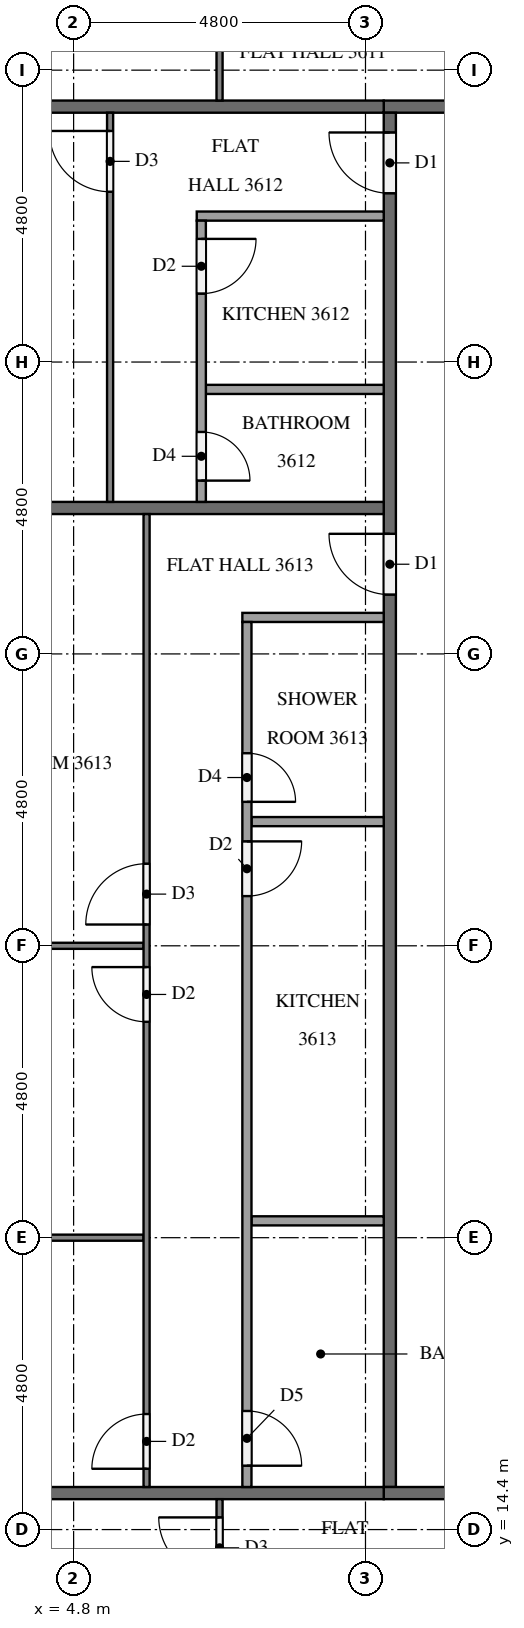
"""IFC4 building model, lengths in metres.
Left out: names, types, materials, properties, quantities, classifications, styles, units other than length and angle.
Written with IfcOpenShell. Run it as: python <this file> out.ifc"""

import sys

from ifc_helpers import new_model, si_unit, direction, frame, frame_2d, origin, place, context, subcontext, project, spatial, rectangle, extrude, element, fill, save


model = new_model("IFC4")
c1 = context("Model", 3, precision=1e-05, world=origin(), true_north=direction((0.0, 1.0)))
c2 = subcontext(c1, "Body", "Model", "MODEL_VIEW")
j1 = project(units=[si_unit("LENGTHUNIT", "METRE"), si_unit("PLANEANGLEUNIT", "RADIAN")], contexts=[c1])
p1 = place(None, origin())
s1 = spatial("IfcSite", under=j1, at=p1, CompositionType="ELEMENT")
p2 = place(p1, origin())
s2 = spatial("IfcBuilding", under=s1, at=p2, CompositionType="ELEMENT")
p3 = place(p2, frame((0.0, 0.0, 140.1)))
s3 = spatial("IfcBuildingStorey", under=s2, at=p3, CompositionType="ELEMENT", Elevation=140.1)
p4 = place(p3, frame((12.1, 37.8, 0.0), z_axis=(0.0, 0.0, 1.0), x_axis=(-1.0, 0.0, 0.0)))
e1 = element("IfcWall", 1, at=p4, inside=s3, PredefinedType="PARTITIONING", context=c2, shape_type="SweptSolid", body=[
    extrude(rectangle(XDim=2.2, YDim=0.2, at=frame_2d((1.1, 0.0))), origin(), (0.0, 0.0, 1.0), 3.1),
])
p5 = place(p3, frame((10.0, 15.1, 0.0), z_axis=(0.0, 0.0, 1.0), x_axis=(0.0, 1.0, 0.0)))
e2 = element("IfcWall", 2, at=p5, inside=s3, PredefinedType="PARTITIONING", context=c2, shape_type="SweptSolid", body=[
    extrude(rectangle(XDim=22.6, YDim=0.2, at=frame_2d((11.3, 0.0))), origin(), (0.0, 0.0, 1.0), 3.1),
])
p6 = place(p5, frame((21.275, 0.0, 0.0)))
e3 = element("IfcOpeningElement", 3, at=p6, cuts=e2, PredefinedType="OPENING", context=c2, shape_type="SweptSolid", body=[
    extrude(rectangle(XDim=1.0, YDim=2.1, at=frame_2d((0.5, 1.05))), frame((0.0, 0.11, 0.0), z_axis=(0.0, -1.0, 0.0), x_axis=(1.0, 0.0, 0.0)), (0.0, 0.0, 1.0), 0.22),
])
p7 = place(p5, frame((14.675, 0.0, 0.0)))
e4 = element("IfcOpeningElement", 4, at=p7, cuts=e2, PredefinedType="OPENING", context=c2, shape_type="SweptSolid", body=[
    extrude(rectangle(XDim=1.0, YDim=2.1, at=frame_2d((0.5, 1.05))), frame((0.0, 0.11, 0.0), z_axis=(0.0, -1.0, 0.0), x_axis=(1.0, 0.0, 0.0)), (0.0, 0.0, 1.0), 0.22),
])
p8 = place(p3, frame((9.9, 15.0, 0.0), z_axis=(0.0, 0.0, 1.0), x_axis=(1.0, 0.0, 0.0)))
e5 = element("IfcWall", 5, at=p8, inside=s3, PredefinedType="PARTITIONING", context=c2, shape_type="SweptSolid", body=[
    extrude(rectangle(XDim=2.2, YDim=0.2, at=frame_2d((1.1, 0.0))), origin(), (0.0, 0.0, 1.0), 3.1),
])
p9 = place(p3, frame((0.375, 37.8, 0.0), z_axis=(0.0, 0.0, 1.0), x_axis=(1.0, 0.0, 0.0)))
e6 = element("IfcWall", 6, at=p9, inside=s3, PredefinedType="PARTITIONING", context=c2, shape_type="SweptSolid", body=[
    extrude(rectangle(XDim=9.525, YDim=0.2, at=frame_2d((4.762, 0.0))), origin(), (0.0, 0.0, 1.0), 3.1),
])
for number, where, z_axis, x_axis in (
    (7, (0.1, 31.2, 0.0), (0.0, 0.0, 1.0), (1.0, 0.0, 0.0)),
    (8, (0.1, 15.0, 0.0), (0.0, 0.0, 1.0), (1.0, 0.0, 0.0)),
):
    element("IfcWall", number, at=place(p3, frame(where, z_axis=z_axis, x_axis=x_axis)), inside=s3, PredefinedType="PARTITIONING", context=c2, shape_type="SweptSolid", body=[
        extrude(rectangle(XDim=9.8, YDim=0.2, at=frame_2d((4.9, 0.0))), origin(), (0.0, 0.0, 1.0), 3.1),
    ])
p10 = place(p3, frame((7.2, 37.9, 0.0), z_axis=(0.0, 0.0, 1.0), x_axis=(0.0, 1.0, 0.0)))
e9 = element("IfcWall", 9, at=p10, inside=s3, PredefinedType="PARTITIONING", context=c2, shape_type="SweptSolid", body=[
    extrude(rectangle(XDim=14.8, YDim=0.1, at=frame_2d((7.4, 0.0))), origin(), (0.0, 0.0, 1.0), 3.1),
])
p11 = place(p10, frame((3.95, 0.0, 0.0)))
e10 = element("IfcOpeningElement", 10, at=p11, cuts=e9, PredefinedType="OPENING", context=c2, shape_type="SweptSolid", body=[
    extrude(rectangle(XDim=1.0, YDim=2.1, at=frame_2d((0.5, 1.05))), frame((0.0, 0.06, 0.0), z_axis=(0.0, -1.0, 0.0), x_axis=(1.0, 0.0, 0.0)), (0.0, 0.0, 1.0), 0.12),
])
p12 = place(p10, frame((5.65, 0.0, 0.0)))
e11 = element("IfcOpeningElement", 11, at=p12, cuts=e9, PredefinedType="OPENING", context=c2, shape_type="SweptSolid", body=[
    extrude(rectangle(XDim=0.9, YDim=2.1, at=frame_2d((0.45, 1.05))), frame((0.0, 0.06, 0.0), z_axis=(0.0, -1.0, 0.0), x_axis=(1.0, 0.0, 0.0)), (0.0, 0.0, 1.0), 0.12),
])
p13 = place(p10, frame((13.6, 0.0, 0.0)))
e12 = element("IfcOpeningElement", 12, at=p13, cuts=e9, PredefinedType="OPENING", context=c2, shape_type="SweptSolid", body=[
    extrude(rectangle(XDim=0.9, YDim=2.1, at=frame_2d((0.45, 1.05))), frame((0.0, 0.06, 0.0), z_axis=(0.0, -1.0, 0.0), x_axis=(1.0, 0.0, 0.0)), (0.0, 0.0, 1.0), 0.12),
])
p14 = place(p3, frame((5.4, 31.3, 0.0), z_axis=(0.0, 0.0, 1.0), x_axis=(0.0, 1.0, 0.0)))
e13 = element("IfcWall", 13, at=p14, inside=s3, PredefinedType="PARTITIONING", context=c2, shape_type="SweptSolid", body=[
    extrude(rectangle(XDim=6.4, YDim=0.1, at=frame_2d((3.2, 0.0))), origin(), (0.0, 0.0, 1.0), 3.1),
])
p15 = place(p14, frame((5.1, 0.0, 0.0)))
e14 = element("IfcOpeningElement", 14, at=p15, cuts=e13, PredefinedType="OPENING", context=c2, shape_type="SweptSolid", body=[
    extrude(rectangle(XDim=1.0, YDim=2.1, at=frame_2d((0.5, 1.05))), frame((0.0, 0.06, 0.0), z_axis=(0.0, -1.0, 0.0), x_axis=(1.0, 0.0, 0.0)), (0.0, 0.0, 1.0), 0.12),
])
p16 = place(p3, frame((9.9, 33.15, 0.0), z_axis=(0.0, 0.0, 1.0), x_axis=(-1.0, 0.0, 0.0)))
e15 = element("IfcWall", 15, at=p16, inside=s3, PredefinedType="PARTITIONING", context=c2, shape_type="SweptSolid", body=[
    extrude(rectangle(XDim=2.925, YDim=0.15, at=frame_2d((1.462, 0.0))), origin(), (0.0, 0.0, 1.0), 3.1),
])
p17 = place(p3, frame((9.9, 36.0, 0.0), z_axis=(0.0, 0.0, 1.0), x_axis=(-1.0, 0.0, 0.0)))
e16 = element("IfcWall", 16, at=p17, inside=s3, PredefinedType="PARTITIONING", context=c2, shape_type="SweptSolid", body=[
    extrude(rectangle(XDim=3.075, YDim=0.15, at=frame_2d((1.538, 0.0))), origin(), (0.0, 0.0, 1.0), 3.1),
])
p18 = place(p3, frame((6.9, 35.925, 0.0), z_axis=(0.0, 0.0, 1.0), x_axis=(0.0, -1.0, 0.0)))
e17 = element("IfcWall", 17, at=p18, inside=s3, PredefinedType="PARTITIONING", context=c2, shape_type="SweptSolid", body=[
    extrude(rectangle(XDim=4.625, YDim=0.15, at=frame_2d((2.312, 0.0))), origin(), (0.0, 0.0, 1.0), 3.1),
])
p19 = place(p18, frame((0.3, 0.0, 0.0)))
e18 = element("IfcOpeningElement", 18, at=p19, cuts=e17, PredefinedType="OPENING", context=c2, shape_type="SweptSolid", body=[
    extrude(rectangle(XDim=0.9, YDim=2.1, at=frame_2d((0.45, 1.05))), frame((0.0, 0.085, 0.0), z_axis=(0.0, -1.0, 0.0), x_axis=(1.0, 0.0, 0.0)), (0.0, 0.0, 1.0), 0.17),
])
p20 = place(p18, frame((3.475, 0.0, 0.0)))
e19 = element("IfcOpeningElement", 19, at=p20, cuts=e17, PredefinedType="OPENING", context=c2, shape_type="SweptSolid", body=[
    extrude(rectangle(XDim=0.8, YDim=2.1, at=frame_2d((0.4, 1.05))), frame((0.0, 0.085, 0.0), z_axis=(0.0, -1.0, 0.0), x_axis=(1.0, 0.0, 0.0)), (0.0, 0.0, 1.0), 0.17),
])
p21 = place(p3, frame((5.95, 24.0, 0.0), z_axis=(0.0, 0.0, 1.0), x_axis=(-1.0, 0.0, 0.0)))
e20 = element("IfcWall", 20, at=p21, inside=s3, PredefinedType="PARTITIONING", context=c2, shape_type="SweptSolid", body=[
    extrude(rectangle(XDim=5.85, YDim=0.1, at=frame_2d((2.925, 0.0))), origin(), (0.0, 0.0, 1.0), 3.1),
])
p22 = place(p3, frame((5.95, 19.2, 0.0), z_axis=(0.0, 0.0, 1.0), x_axis=(-1.0, 0.0, 0.0)))
e21 = element("IfcWall", 21, at=p22, inside=s3, PredefinedType="PARTITIONING", context=c2, shape_type="SweptSolid", body=[
    extrude(rectangle(XDim=5.575, YDim=0.1, at=frame_2d((2.788, 0.0))), origin(), (0.0, 0.0, 1.0), 3.1),
])
p23 = place(p3, frame((6.0, 15.1, 0.0), z_axis=(0.0, 0.0, 1.0), x_axis=(0.0, 1.0, 0.0)))
e22 = element("IfcWall", 22, at=p23, inside=s3, PredefinedType="PARTITIONING", context=c2, shape_type="SweptSolid", body=[
    extrude(rectangle(XDim=16.0, YDim=0.1, at=frame_2d((8.0, 0.0))), origin(), (0.0, 0.0, 1.0), 3.1),
])
p24 = place(p23, frame((9.25, 0.0, 0.0)))
e23 = element("IfcOpeningElement", 23, at=p24, cuts=e22, PredefinedType="OPENING", context=c2, shape_type="SweptSolid", body=[
    extrude(rectangle(XDim=1.0, YDim=2.1, at=frame_2d((0.5, 1.05))), frame((0.0, 0.06, 0.0), z_axis=(0.0, -1.0, 0.0), x_axis=(1.0, 0.0, 0.0)), (0.0, 0.0, 1.0), 0.12),
])
p25 = place(p23, frame((7.65, 0.0, 0.0)))
e24 = element("IfcOpeningElement", 24, at=p25, cuts=e22, PredefinedType="OPENING", context=c2, shape_type="SweptSolid", body=[
    extrude(rectangle(XDim=0.9, YDim=2.1, at=frame_2d((0.45, 1.05))), frame((0.0, 0.06, 0.0), z_axis=(0.0, -1.0, 0.0), x_axis=(1.0, 0.0, 0.0)), (0.0, 0.0, 1.0), 0.12),
])
p26 = place(p23, frame((0.3, 0.0, 0.0)))
e25 = element("IfcOpeningElement", 25, at=p26, cuts=e22, PredefinedType="OPENING", context=c2, shape_type="SweptSolid", body=[
    extrude(rectangle(XDim=0.9, YDim=2.1, at=frame_2d((0.45, 1.05))), frame((0.0, 0.06, 0.0), z_axis=(0.0, -1.0, 0.0), x_axis=(1.0, 0.0, 0.0)), (0.0, 0.0, 1.0), 0.12),
])
for number, where, z_axis, x_axis in (
    (26, (9.9, 26.042, 0.0), (0.0, 0.0, 1.0), (-1.0, 0.0, 0.0)),
    (27, (9.9, 19.477, 0.0), (0.0, 0.0, 1.0), (-1.0, 0.0, 0.0)),
):
    element("IfcWall", number, at=place(p3, frame(where, z_axis=z_axis, x_axis=x_axis)), inside=s3, PredefinedType="PARTITIONING", context=c2, shape_type="SweptSolid", body=[
        extrude(rectangle(XDim=2.175, YDim=0.15, at=frame_2d((1.087, 0.0))), origin(), (0.0, 0.0, 1.0), 3.1),
    ])
p27 = place(p3, frame((9.9, 29.4, 0.0), z_axis=(0.0, 0.0, 1.0), x_axis=(-1.0, 0.0, 0.0)))
e28 = element("IfcWall", 28, at=p27, inside=s3, PredefinedType="PARTITIONING", context=c2, shape_type="SweptSolid", body=[
    extrude(rectangle(XDim=2.325, YDim=0.15, at=frame_2d((1.163, 0.0))), origin(), (0.0, 0.0, 1.0), 3.1),
])
p28 = place(p3, frame((7.65, 29.325, 0.0), z_axis=(0.0, 0.0, 1.0), x_axis=(0.0, -1.0, 0.0)))
e29 = element("IfcWall", 29, at=p28, inside=s3, PredefinedType="PARTITIONING", context=c2, shape_type="SweptSolid", body=[
    extrude(rectangle(XDim=14.225, YDim=0.15, at=frame_2d((7.112, 0.0))), origin(), (0.0, 0.0, 1.0), 3.1),
])
p29 = place(p28, frame((2.158, 0.0, 0.0)))
e30 = element("IfcOpeningElement", 30, at=p29, cuts=e29, PredefinedType="OPENING", context=c2, shape_type="SweptSolid", body=[
    extrude(rectangle(XDim=0.8, YDim=2.1, at=frame_2d((0.4, 1.05))), frame((0.0, 0.085, 0.0), z_axis=(0.0, -1.0, 0.0), x_axis=(1.0, 0.0, 0.0)), (0.0, 0.0, 1.0), 0.17),
])
p30 = place(p28, frame((3.608, 0.0, 0.0)))
e31 = element("IfcOpeningElement", 31, at=p30, cuts=e29, PredefinedType="OPENING", context=c2, shape_type="SweptSolid", body=[
    extrude(rectangle(XDim=0.9, YDim=2.1, at=frame_2d((0.45, 1.05))), frame((0.0, 0.085, 0.0), z_axis=(0.0, -1.0, 0.0), x_axis=(1.0, 0.0, 0.0)), (0.0, 0.0, 1.0), 0.17),
])
p31 = place(p28, frame((12.975, 0.0, 0.0)))
e32 = element("IfcOpeningElement", 32, at=p31, cuts=e29, PredefinedType="OPENING", context=c2, shape_type="SweptSolid", body=[
    extrude(rectangle(XDim=0.9, YDim=2.1, at=frame_2d((0.45, 1.05))), frame((0.0, 0.085, 0.0), z_axis=(0.0, -1.0, 0.0), x_axis=(1.0, 0.0, 0.0)), (0.0, 0.0, 1.0), 0.17),
])
p32 = place(p3, frame((7.2, 4.9, 0.0), z_axis=(0.0, 0.0, 1.0), x_axis=(0.0, 1.0, 0.0)))
e33 = element("IfcWall", 33, at=p32, inside=s3, PredefinedType="PARTITIONING", context=c2, shape_type="SweptSolid", body=[
    extrude(rectangle(XDim=10.0, YDim=0.1, at=frame_2d((5.0, 0.0))), origin(), (0.0, 0.0, 1.0), 3.1),
])
p33 = place(p32, frame((8.7, 0.0, 0.0)))
e34 = element("IfcOpeningElement", 34, at=p33, cuts=e33, PredefinedType="OPENING", context=c2, shape_type="SweptSolid", body=[
    extrude(rectangle(XDim=1.0, YDim=2.1, at=frame_2d((0.5, 1.05))), frame((0.0, 0.06, 0.0), z_axis=(0.0, -1.0, 0.0), x_axis=(1.0, 0.0, 0.0)), (0.0, 0.0, 1.0), 0.12),
])
p34 = place(p32, frame((0.3, 0.0, 0.0)))
e35 = element("IfcOpeningElement", 35, at=p34, cuts=e33, PredefinedType="OPENING", context=c2, shape_type="SweptSolid", body=[
    extrude(rectangle(XDim=0.9, YDim=2.1, at=frame_2d((0.45, 1.05))), frame((0.0, 0.06, 0.0), z_axis=(0.0, -1.0, 0.0), x_axis=(1.0, 0.0, 0.0)), (0.0, 0.0, 1.0), 0.12),
])
p35 = place(p6, origin())
e36 = element("IfcDoor", 36, at=p35, inside=s3, OperationType="SINGLE_SWING_RIGHT", PredefinedType="DOOR", context=c2, shape_type="SweptSolid", body=[
    extrude(rectangle(XDim=1.0, YDim=2.1, at=frame_2d((0.5, 1.05))), frame((0.0, 0.025, 0.0), z_axis=(0.0, -1.0, 0.0), x_axis=(1.0, 0.0, 0.0)), (0.0, 0.0, 1.0), 0.05),
])
fill(e3, e36)
p36 = place(p7, origin())
e37 = element("IfcDoor", 37, at=p36, inside=s3, OperationType="SINGLE_SWING_RIGHT", PredefinedType="DOOR", context=c2, shape_type="SweptSolid", body=[
    extrude(rectangle(XDim=1.0, YDim=2.1, at=frame_2d((0.5, 1.05))), frame((0.0, 0.025, 0.0), z_axis=(0.0, -1.0, 0.0), x_axis=(1.0, 0.0, 0.0)), (0.0, 0.0, 1.0), 0.05),
])
fill(e4, e37)
p37 = place(p15, origin())
e38 = element("IfcDoor", 38, at=p37, inside=s3, OperationType="SINGLE_SWING_RIGHT", PredefinedType="DOOR", context=c2, shape_type="SweptSolid", body=[
    extrude(rectangle(XDim=1.0, YDim=2.1, at=frame_2d((0.5, 1.05))), frame((0.0, 0.025, 0.0), z_axis=(0.0, -1.0, 0.0), x_axis=(1.0, 0.0, 0.0)), (0.0, 0.0, 1.0), 0.05),
])
fill(e14, e38)
p38 = place(p19, origin())
e39 = element("IfcDoor", 39, at=p38, inside=s3, OperationType="SINGLE_SWING_LEFT", PredefinedType="DOOR", context=c2, shape_type="SweptSolid", body=[
    extrude(rectangle(XDim=0.9, YDim=2.1, at=frame_2d((0.45, 1.05))), frame((0.0, 0.025, 0.0), z_axis=(0.0, -1.0, 0.0), x_axis=(1.0, 0.0, 0.0)), (0.0, 0.0, 1.0), 0.05),
])
fill(e18, e39)
p39 = place(p20, origin())
e40 = element("IfcDoor", 40, at=p39, inside=s3, OperationType="SINGLE_SWING_RIGHT", PredefinedType="DOOR", context=c2, shape_type="SweptSolid", body=[
    extrude(rectangle(XDim=0.8, YDim=2.1, at=frame_2d((0.4, 1.05))), frame((0.0, 0.025, 0.0), z_axis=(0.0, -1.0, 0.0), x_axis=(1.0, 0.0, 0.0)), (0.0, 0.0, 1.0), 0.05),
])
fill(e19, e40)
p40 = place(p24, origin())
e41 = element("IfcDoor", 41, at=p40, inside=s3, OperationType="SINGLE_SWING_LEFT", PredefinedType="DOOR", context=c2, shape_type="SweptSolid", body=[
    extrude(rectangle(XDim=1.0, YDim=2.1, at=frame_2d((0.5, 1.05))), frame((0.0, 0.025, 0.0), z_axis=(0.0, -1.0, 0.0), x_axis=(1.0, 0.0, 0.0)), (0.0, 0.0, 1.0), 0.05),
])
fill(e23, e41)
p41 = place(p25, origin())
e42 = element("IfcDoor", 42, at=p41, inside=s3, OperationType="SINGLE_SWING_RIGHT", PredefinedType="DOOR", context=c2, shape_type="SweptSolid", body=[
    extrude(rectangle(XDim=0.9, YDim=2.1, at=frame_2d((0.45, 1.05))), frame((0.0, 0.025, 0.0), z_axis=(0.0, -1.0, 0.0), x_axis=(1.0, 0.0, 0.0)), (0.0, 0.0, 1.0), 0.05),
])
fill(e24, e42)
p42 = place(p26, origin())
e43 = element("IfcDoor", 43, at=p42, inside=s3, OperationType="SINGLE_SWING_LEFT", PredefinedType="DOOR", context=c2, shape_type="SweptSolid", body=[
    extrude(rectangle(XDim=0.9, YDim=2.1, at=frame_2d((0.45, 1.05))), frame((0.0, 0.025, 0.0), z_axis=(0.0, -1.0, 0.0), x_axis=(1.0, 0.0, 0.0)), (0.0, 0.0, 1.0), 0.05),
])
fill(e25, e43)
p43 = place(p29, origin())
e44 = element("IfcDoor", 44, at=p43, inside=s3, OperationType="SINGLE_SWING_RIGHT", PredefinedType="DOOR", context=c2, shape_type="SweptSolid", body=[
    extrude(rectangle(XDim=0.8, YDim=2.1, at=frame_2d((0.4, 1.05))), frame((0.0, 0.025, 0.0), z_axis=(0.0, -1.0, 0.0), x_axis=(1.0, 0.0, 0.0)), (0.0, 0.0, 1.0), 0.05),
])
fill(e30, e44)
p44 = place(p30, origin())
e45 = element("IfcDoor", 45, at=p44, inside=s3, OperationType="SINGLE_SWING_LEFT", PredefinedType="DOOR", context=c2, shape_type="SweptSolid", body=[
    extrude(rectangle(XDim=0.9, YDim=2.1, at=frame_2d((0.45, 1.05))), frame((0.0, 0.025, 0.0), z_axis=(0.0, -1.0, 0.0), x_axis=(1.0, 0.0, 0.0)), (0.0, 0.0, 1.0), 0.05),
])
fill(e31, e45)
p45 = place(p31, origin())
e46 = element("IfcDoor", 46, at=p45, inside=s3, OperationType="SINGLE_SWING_RIGHT", PredefinedType="DOOR", context=c2, shape_type="SweptSolid", body=[
    extrude(rectangle(XDim=0.9, YDim=2.1, at=frame_2d((0.45, 1.05))), frame((0.0, 0.025, 0.0), z_axis=(0.0, -1.0, 0.0), x_axis=(1.0, 0.0, 0.0)), (0.0, 0.0, 1.0), 0.05),
])
fill(e32, e46)
p46 = place(p33, origin())
e47 = element("IfcDoor", 47, at=p46, inside=s3, OperationType="SINGLE_SWING_RIGHT", PredefinedType="DOOR", context=c2, shape_type="SweptSolid", body=[
    extrude(rectangle(XDim=1.0, YDim=2.1, at=frame_2d((0.5, 1.05))), frame((0.0, 0.025, 0.0), z_axis=(0.0, -1.0, 0.0), x_axis=(1.0, 0.0, 0.0)), (0.0, 0.0, 1.0), 0.05),
])
fill(e34, e47)
save(model, sys.argv[1])
